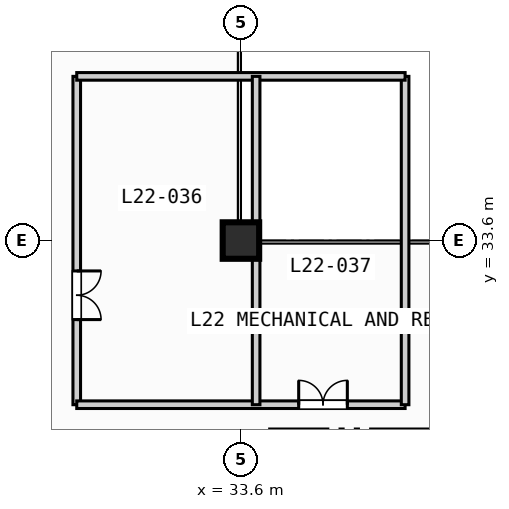
"""IFC4 building model, lengths in metres.
Left out: names, types, materials, properties, quantities, classifications, styles, units other than length and angle.
Written with IfcOpenShell. Run it as: python <this file> out.ifc"""

import sys

from ifc_helpers import new_model, si_unit, direction, frame, frame_2d, origin, origin_2d, place, context, subcontext, project, spatial, rectangle, extrude, element, fill, save


model = new_model("IFC4")
c1 = context("Model", 3, precision=1e-05, world=origin(), true_north=direction((0.0, 1.0)))
c2 = subcontext(c1, "Body", "Model", "MODEL_VIEW")
j1 = project(units=[si_unit("LENGTHUNIT", "METRE"), si_unit("PLANEANGLEUNIT", "RADIAN")], contexts=[c1])
p1 = place(None, origin())
s1 = spatial("IfcSite", under=j1, at=p1, CompositionType="ELEMENT")
p2 = place(p1, origin())
s2 = spatial("IfcBuilding", under=s1, at=p2, CompositionType="ELEMENT")
p3 = place(p2, frame((0.0, 0.0, 94.0)))
s3 = spatial("IfcBuildingStorey", under=s2, at=p3, CompositionType="ELEMENT", Elevation=94.0)
p4 = place(p3, frame((33.6, 33.6, 0.0), z_axis=(0.0, 0.0, 1.0), x_axis=(1.0, 0.0, 0.0)))
e1 = element("IfcColumn", 1, at=p4, inside=s3, PredefinedType="COLUMN", context=c2, shape_type="SweptSolid", body=[
    extrude(rectangle(XDim=1.2, YDim=1.2, at=origin_2d()), origin(), (0.0, 0.0, 1.0), 6.0),
])
p5 = place(p3, frame((28.2, 28.2, 0.0), z_axis=(0.0, 0.0, 1.0), x_axis=(0.0, 1.0, 0.0)))
e2 = element("IfcWall", 2, at=p5, inside=s3, PredefinedType="SOLIDWALL", context=c2, shape_type="SweptSolid", body=[
    extrude(rectangle(XDim=10.8, YDim=0.25, at=frame_2d((5.4, 0.0))), origin(), (0.0, 0.0, 1.0), 5.75),
])
p6 = place(p5, frame((2.8, 0.0, 0.0)))
e3 = element("IfcOpeningElement", 3, at=p6, cuts=e2, PredefinedType="OPENING", context=c2, shape_type="SweptSolid", body=[
    extrude(rectangle(XDim=1.6, YDim=2.2, at=frame_2d((0.8, 1.1))), frame((0.0, 0.135, 0.0), z_axis=(0.0, -1.0, 0.0), x_axis=(1.0, 0.0, 0.0)), (0.0, 0.0, 1.0), 0.27),
])
p7 = place(p3, frame((28.2, 28.2, 0.0), z_axis=(0.0, 0.0, 1.0), x_axis=(1.0, 0.0, 0.0)))
e4 = element("IfcWall", 4, at=p7, inside=s3, PredefinedType="SOLIDWALL", context=c2, shape_type="SweptSolid", body=[
    extrude(rectangle(XDim=10.8, YDim=0.25, at=frame_2d((5.4, 0.0))), origin(), (0.0, 0.0, 1.0), 5.75),
])
p8 = place(p7, frame((7.3, 0.0, 0.0)))
e5 = element("IfcOpeningElement", 5, at=p8, cuts=e4, PredefinedType="OPENING", context=c2, shape_type="SweptSolid", body=[
    extrude(rectangle(XDim=1.6, YDim=2.2, at=frame_2d((0.8, 1.1))), frame((0.0, 0.135, 0.0), z_axis=(0.0, -1.0, 0.0), x_axis=(1.0, 0.0, 0.0)), (0.0, 0.0, 1.0), 0.27),
])
for number, where, z_axis, x_axis in (
    (6, (39.0, 28.2, 0.0), (0.0, 0.0, 1.0), (0.0, 1.0, 0.0)),
    (7, (28.2, 39.0, 0.0), (0.0, 0.0, 1.0), (1.0, 0.0, 0.0)),
    (8, (34.1, 28.2, 0.0), (0.0, 0.0, 1.0), (0.0, 1.0, 0.0)),
):
    element("IfcWall", number, at=place(p3, frame(where, z_axis=z_axis, x_axis=x_axis)), inside=s3, PredefinedType="SOLIDWALL", context=c2, shape_type="SweptSolid", body=[
        extrude(rectangle(XDim=10.8, YDim=0.25, at=frame_2d((5.4, 0.0))), origin(), (0.0, 0.0, 1.0), 5.75),
    ])
p9 = place(p6, origin())
e9 = element("IfcDoor", 9, at=p9, inside=s3, OperationType="SINGLE_SWING_RIGHT", PredefinedType="DOOR", context=c2, shape_type="SweptSolid", body=[
    extrude(rectangle(XDim=1.6, YDim=2.2, at=frame_2d((0.8, 1.1))), frame((0.0, 0.025, 0.0), z_axis=(0.0, -1.0, 0.0), x_axis=(1.0, 0.0, 0.0)), (0.0, 0.0, 1.0), 0.05),
])
fill(e3, e9)
p10 = place(p8, origin())
e10 = element("IfcDoor", 10, at=p10, inside=s3, OperationType="SINGLE_SWING_LEFT", PredefinedType="DOOR", context=c2, shape_type="SweptSolid", body=[
    extrude(rectangle(XDim=1.6, YDim=2.2, at=frame_2d((0.8, 1.1))), frame((0.0, 0.025, 0.0), z_axis=(0.0, -1.0, 0.0), x_axis=(1.0, 0.0, 0.0)), (0.0, 0.0, 1.0), 0.05),
])
fill(e5, e10)
save(model, sys.argv[1])
